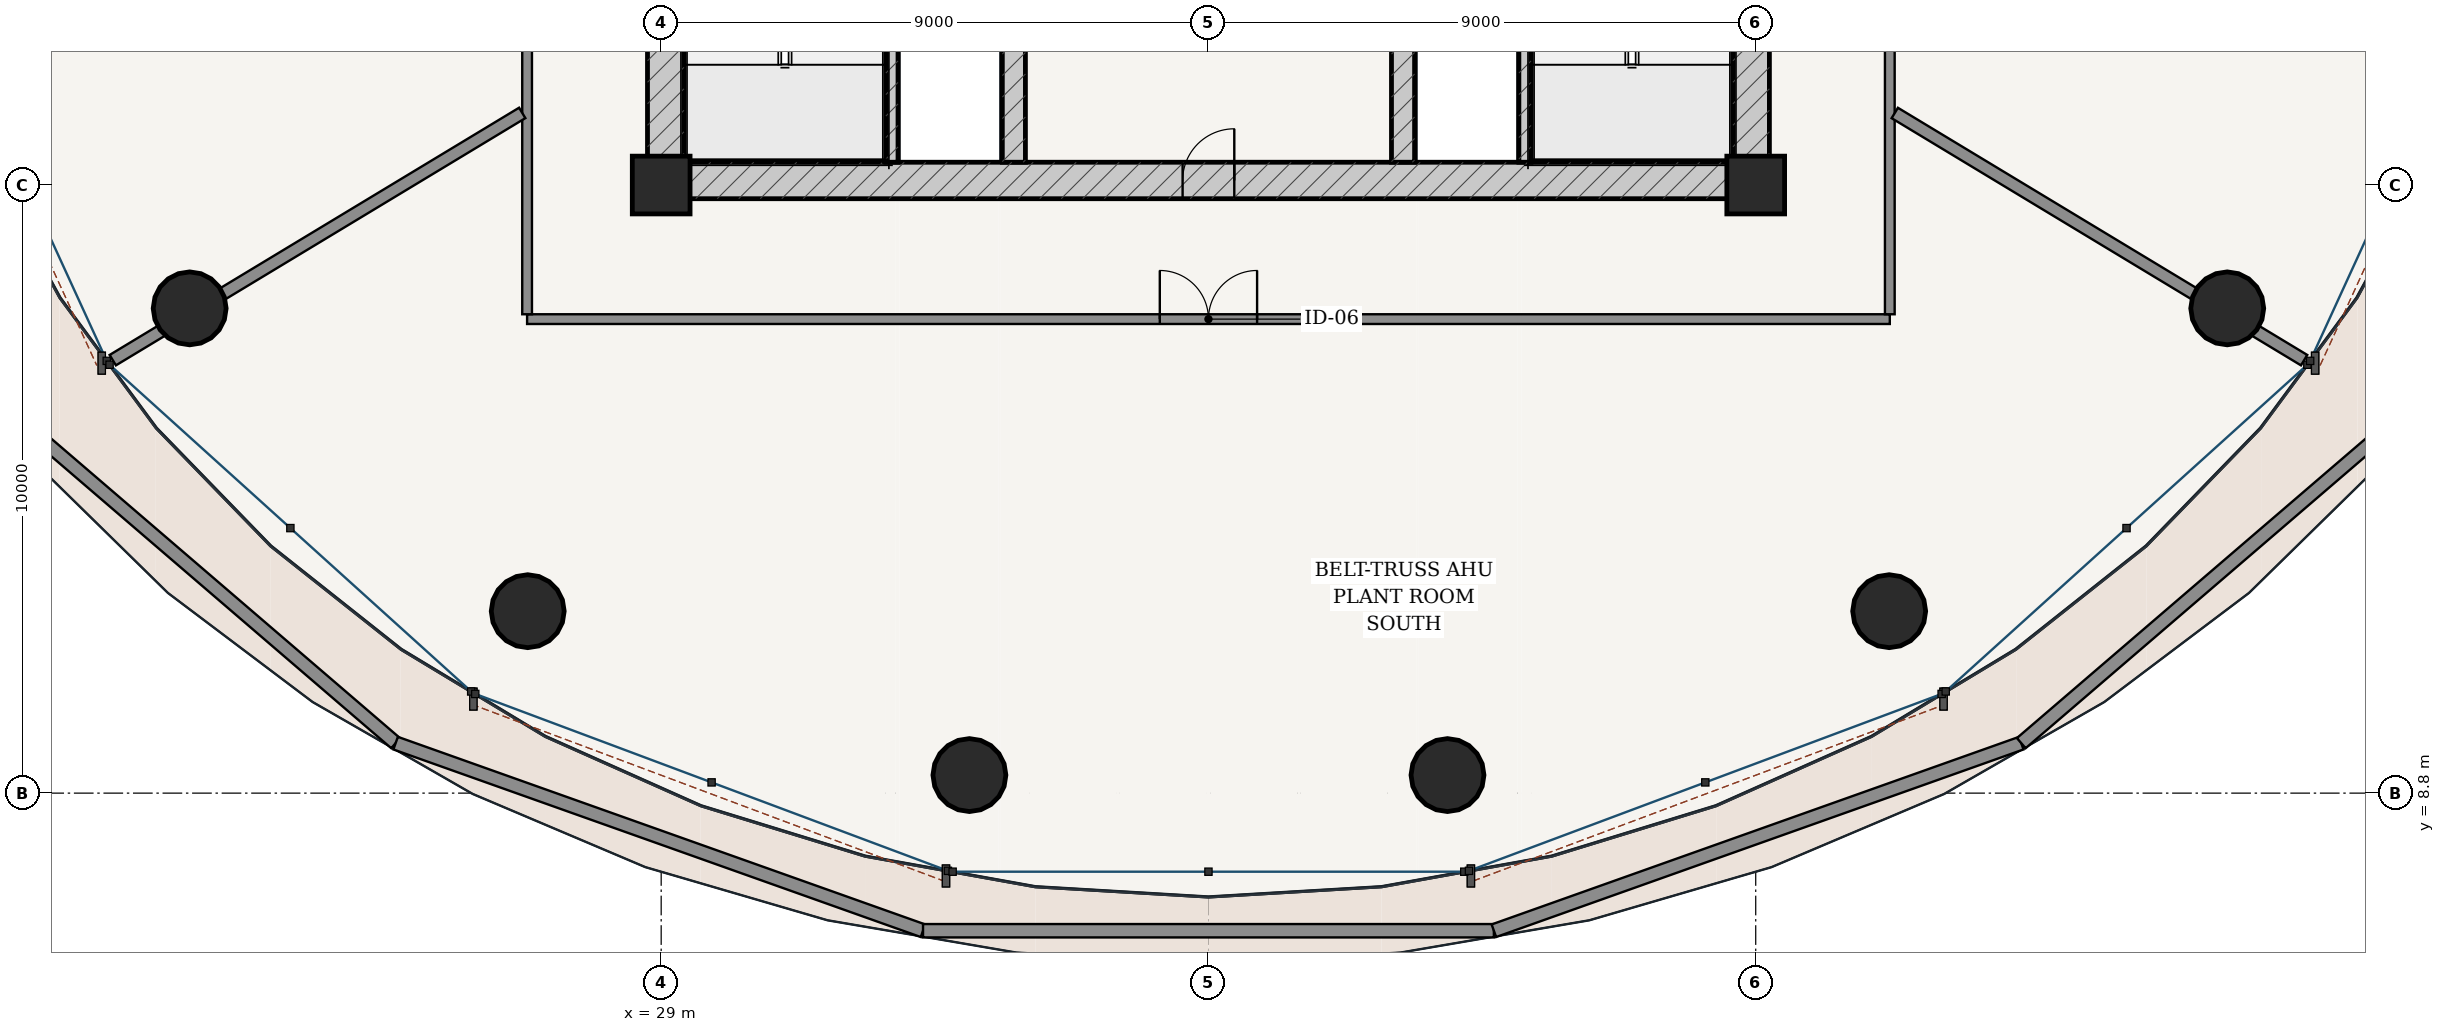
"""IFC4 building model, lengths in metres.
Left out: names, types, materials, properties, quantities, classifications, styles, units other than length and angle.
Written with IfcOpenShell. Run it as: python <this file> out.ifc"""

import sys

from ifc_helpers import new_model, si_unit, direction, frame, frame_2d, origin, origin_2d, place, context, subcontext, project, spatial, rectangle, hollow_circle, extrude, source, transform, mapped, element, fill, save


model = new_model("IFC4")
c1 = context("Model", 3, precision=1e-05, world=origin(), true_north=direction((-0.2419218956, 0.970295726276)))
c2 = subcontext(c1, "Body", "Model", "MODEL_VIEW")
j1 = project(units=[si_unit("LENGTHUNIT", "METRE"), si_unit("PLANEANGLEUNIT", "RADIAN")], contexts=[c1])
p1 = place(None, origin())
s1 = spatial("IfcSite", under=j1, at=p1, CompositionType="ELEMENT")
p2 = place(p1, origin())
s2 = spatial("IfcBuilding", under=s1, at=p2, CompositionType="ELEMENT")
p3 = place(p2, frame((0.0, 0.0, 185.8)))
s3 = spatial("IfcBuildingStorey", under=s2, at=p3, CompositionType="ELEMENT", Elevation=185.8)
for number, where, z_axis, x_axis in (
    (1, (29.0, 18.8, 0.0), (0.0, 0.0, 1.0), (1.0, 0.0, 0.0)),
    (2, (47.0, 18.8, 0.0), (0.0, 0.0, 1.0), (1.0, 0.0, 0.0)),
):
    element("IfcColumn", number, at=place(p3, frame(where, z_axis=z_axis, x_axis=x_axis)), inside=s3, PredefinedType="COLUMN", context=c2, shape_type="SweptSolid", body=[
        extrude(rectangle(XDim=0.95, YDim=0.95, at=origin_2d()), origin(), (0.0, 0.0, 1.0), 5.4),
    ])
p4 = place(p3, frame((28.775, 18.875, 0.0), z_axis=(0.0, 0.0, 1.0), x_axis=(1.0, 0.0, 0.0)))
e3 = element("IfcWall", 3, at=p4, inside=s3, PredefinedType="SHEAR", context=c2, shape_type="SweptSolid", body=[
    extrude(rectangle(XDim=18.45, YDim=0.6, at=frame_2d((9.225, 0.0))), origin(), (0.0, 0.0, 1.0), 5.135),
])
p5 = place(p4, frame((8.8, 0.0, 0.0)))
e4 = element("IfcOpeningElement", 4, at=p5, cuts=e3, PredefinedType="OPENING", context=c2, shape_type="SweptSolid", body=[
    extrude(rectangle(XDim=0.85, YDim=2.1, at=frame_2d((0.425, 1.05))), frame((0.0, 0.31, 0.0), z_axis=(0.0, -1.0, 0.0), x_axis=(1.0, 0.0, 0.0)), (0.0, 0.0, 1.0), 0.62),
])
p6 = place(p3, frame((29.075, 19.175, 0.0), z_axis=(0.0, 0.0, 1.0), x_axis=(0.0, 1.0, 0.0)))
e5 = element("IfcWall", 5, at=p6, inside=s3, PredefinedType="SHEAR", context=c2, shape_type="SweptSolid", body=[
    extrude(rectangle(XDim=15.25, YDim=0.6, at=frame_2d((7.625, 0.0))), origin(), (0.0, 0.0, 1.0), 5.135),
])
p7 = place(p6, frame((9.875, 0.0, 0.0)))
e6 = element("IfcOpeningElement", 6, at=p7, cuts=e5, PredefinedType="OPENING", context=c2, shape_type="SweptSolid", body=[
    extrude(rectangle(XDim=1.5, YDim=2.2, at=frame_2d((0.75, 1.1))), frame((0.0, 0.31, 0.0), z_axis=(0.0, -1.0, 0.0), x_axis=(1.0, 0.0, 0.0)), (0.0, 0.0, 1.0), 0.62),
])
p8 = place(p3, frame((46.925, 19.175, 0.0), z_axis=(0.0, 0.0, 1.0), x_axis=(0.0, 1.0, 0.0)))
e7 = element("IfcWall", 7, at=p8, inside=s3, PredefinedType="SHEAR", context=c2, shape_type="SweptSolid", body=[
    extrude(rectangle(XDim=15.25, YDim=0.6, at=frame_2d((7.625, 0.0))), origin(), (0.0, 0.0, 1.0), 5.135),
])
p9 = place(p8, frame((9.875, 0.0, 0.0)))
e8 = element("IfcOpeningElement", 8, at=p9, cuts=e7, PredefinedType="OPENING", context=c2, shape_type="SweptSolid", body=[
    extrude(rectangle(XDim=1.5, YDim=2.2, at=frame_2d((0.75, 1.1))), frame((0.0, 0.31, 0.0), z_axis=(0.0, -1.0, 0.0), x_axis=(1.0, 0.0, 0.0)), (0.0, 0.0, 1.0), 0.62),
])
for number, where, z_axis, x_axis in (
    (9, (32.795, 19.175, 0.0), (0.0, 0.0, 1.0), (0.0, 1.0, 0.0)),
    (10, (43.205, 19.175, 0.0), (0.0, 0.0, 1.0), (0.0, 1.0, 0.0)),
):
    element("IfcWall", number, at=place(p3, frame(where, z_axis=z_axis, x_axis=x_axis)), inside=s3, PredefinedType="SOLIDWALL", context=c2, shape_type="SweptSolid", body=[
        extrude(rectangle(XDim=7.375, YDim=0.2, at=frame_2d((3.688, 0.0))), origin(), (0.0, 0.0, 1.0), 5.135),
    ])
p10 = place(p3, frame((34.8, 19.175, 0.0), z_axis=(0.0, 0.0, 1.0), x_axis=(0.0, 1.0, 0.0)))
e11 = element("IfcWall", 11, at=p10, inside=s3, PredefinedType="SHEAR", context=c2, shape_type="SweptSolid", body=[
    extrude(rectangle(XDim=15.25, YDim=0.38, at=frame_2d((7.625, 0.0))), origin(), (0.0, 0.0, 1.0), 5.135),
])
p11 = place(p10, frame((7.8, 0.0, 0.0)))
e12 = element("IfcOpeningElement", 12, at=p11, cuts=e11, PredefinedType="OPENING", context=c2, shape_type="SweptSolid", body=[
    extrude(rectangle(XDim=1.05, YDim=2.15, at=frame_2d((0.525, 1.075))), frame((0.0, 0.2, 0.0), z_axis=(0.0, -1.0, 0.0), x_axis=(1.0, 0.0, 0.0)), (0.0, 0.0, 1.0), 0.4),
])
p12 = place(p3, frame((41.2, 19.175, 0.0), z_axis=(0.0, 0.0, 1.0), x_axis=(0.0, 1.0, 0.0)))
e13 = element("IfcWall", 13, at=p12, inside=s3, PredefinedType="SHEAR", context=c2, shape_type="SweptSolid", body=[
    extrude(rectangle(XDim=15.25, YDim=0.38, at=frame_2d((7.625, 0.0))), origin(), (0.0, 0.0, 1.0), 5.135),
])
p13 = place(p12, frame((7.8, 0.0, 0.0)))
e14 = element("IfcOpeningElement", 14, at=p13, cuts=e13, PredefinedType="OPENING", context=c2, shape_type="SweptSolid", body=[
    extrude(rectangle(XDim=1.05, YDim=2.15, at=frame_2d((0.525, 1.075))), frame((0.0, 0.2, 0.0), z_axis=(0.0, -1.0, 0.0), x_axis=(1.0, 0.0, 0.0)), (0.0, 0.0, 1.0), 0.4),
])
for number, where, z_axis, x_axis in (
    (15, (21.246, 16.772, 0.0), (0.0, 0.0, 1.0), (1.0, 0.0, 0.0)),
    (16, (26.805, 11.792, 0.0), (0.0, 0.0, 1.0), (1.0, 0.0, 0.0)),
    (17, (34.069, 9.097, 0.0), (0.0, 0.0, 1.0), (1.0, 0.0, 0.0)),
    (18, (41.931, 9.097, 0.0), (0.0, 0.0, 1.0), (1.0, 0.0, 0.0)),
    (19, (49.195, 11.792, 0.0), (0.0, 0.0, 1.0), (1.0, 0.0, 0.0)),
    (20, (54.754, 16.772, 0.0), (0.0, 0.0, 1.0), (1.0, 0.0, 0.0)),
):
    element("IfcColumn", number, at=place(p3, frame(where, z_axis=z_axis, x_axis=x_axis)), inside=s3, PredefinedType="COLUMN", context=c2, shape_type="SweptSolid", body=[
        extrude(hollow_circle(Radius=0.6, WallThickness=0.038, at=origin_2d()), origin(), (0.0, 0.0, 1.0), 5.4),
    ])
p14 = place(p3, frame((17.995, 15.322, 0.0), z_axis=(0.0, 0.0, 1.0), x_axis=(0.758673296268, -0.651471280664, 0.0)))
e21 = element("IfcWall", 21, at=p14, inside=s3, PredefinedType="PARAPET", context=c2, shape_type="SweptSolid", body=[
    extrude(rectangle(XDim=8.75, YDim=0.22, at=frame_2d((4.375, 0.0))), origin(), (0.0, 0.0, 1.0), 1.15),
])
p15 = place(p3, frame((24.633, 9.622, 0.0), z_axis=(0.0, 0.0, 1.0), x_axis=(0.942173755835, -0.335124773504, 0.0)))
e22 = element("IfcWall", 22, at=p15, inside=s3, PredefinedType="PARAPET", context=c2, shape_type="SweptSolid", body=[
    extrude(rectangle(XDim=9.205, YDim=0.22, at=frame_2d((4.603, 0.0))), origin(), (0.0, 0.0, 1.0), 1.15),
])
p16 = place(p3, frame((33.306, 6.537, 0.0), z_axis=(0.0, 0.0, 1.0), x_axis=(1.0, 0.0, 0.0)))
e23 = element("IfcWall", 23, at=p16, inside=s3, PredefinedType="PARAPET", context=c2, shape_type="SweptSolid", body=[
    extrude(rectangle(XDim=9.388, YDim=0.22, at=frame_2d((4.694, 0.0))), origin(), (0.0, 0.0, 1.0), 1.15),
])
p17 = place(p3, frame((42.694, 6.537, 0.0), z_axis=(0.0, 0.0, 1.0), x_axis=(0.942173755835, 0.335124773504, 0.0)))
e24 = element("IfcWall", 24, at=p17, inside=s3, PredefinedType="PARAPET", context=c2, shape_type="SweptSolid", body=[
    extrude(rectangle(XDim=9.205, YDim=0.22, at=frame_2d((4.603, 0.0))), origin(), (0.0, 0.0, 1.0), 1.15),
])
p18 = place(p3, frame((51.367, 9.622, 0.0), z_axis=(0.0, 0.0, 1.0), x_axis=(0.758673296268, 0.651471280664, 0.0)))
e25 = element("IfcWall", 25, at=p18, inside=s3, PredefinedType="PARAPET", context=c2, shape_type="SweptSolid", body=[
    extrude(rectangle(XDim=8.75, YDim=0.22, at=frame_2d((4.375, 0.0))), origin(), (0.0, 0.0, 1.0), 1.15),
])
p19 = place(p3, frame((26.795, 16.595, 0.0), z_axis=(0.0, 0.0, 1.0), x_axis=(1.0, 0.0, 0.0)))
e26 = element("IfcWall", 26, at=p19, inside=s3, PredefinedType="PARTITIONING", context=c2, shape_type="SweptSolid", body=[
    extrude(rectangle(XDim=22.41, YDim=0.16, at=frame_2d((11.205, 0.0))), origin(), (0.0, 0.0, 1.0), 4.651),
])
p20 = place(p19, frame((10.405, 0.0, 0.0)))
e27 = element("IfcOpeningElement", 27, at=p20, cuts=e26, PredefinedType="OPENING", context=c2, shape_type="SweptSolid", body=[
    extrude(rectangle(XDim=1.6, YDim=2.25, at=frame_2d((0.8, 1.125))), frame((0.0, 0.09, 0.0), z_axis=(0.0, -1.0, 0.0), x_axis=(1.0, 0.0, 0.0)), (0.0, 0.0, 1.0), 0.18),
])
p21 = place(p3, frame((26.795, 16.675, 0.0), z_axis=(0.0, 0.0, 1.0), x_axis=(0.0, 1.0, 0.0)))
e28 = element("IfcWall", 28, at=p21, inside=s3, PredefinedType="PARTITIONING", context=c2, shape_type="SweptSolid", body=[
    extrude(rectangle(XDim=20.25, YDim=0.16, at=frame_2d((10.125, 0.0))), origin(), (0.0, 0.0, 1.0), 4.651),
])
p22 = place(p21, frame((9.375, 0.0, 0.0)))
e29 = element("IfcOpeningElement", 29, at=p22, cuts=e28, PredefinedType="OPENING", context=c2, shape_type="SweptSolid", body=[
    extrude(rectangle(XDim=1.5, YDim=2.2, at=frame_2d((0.75, 1.1))), frame((0.0, 0.09, 0.0), z_axis=(0.0, -1.0, 0.0), x_axis=(1.0, 0.0, 0.0)), (0.0, 0.0, 1.0), 0.18),
])
p23 = place(p3, frame((49.205, 16.675, 0.0), z_axis=(0.0, 0.0, 1.0), x_axis=(0.0, 1.0, 0.0)))
e30 = element("IfcWall", 30, at=p23, inside=s3, PredefinedType="PARTITIONING", context=c2, shape_type="SweptSolid", body=[
    extrude(rectangle(XDim=20.25, YDim=0.16, at=frame_2d((10.125, 0.0))), origin(), (0.0, 0.0, 1.0), 4.651),
])
p24 = place(p23, frame((9.325, 0.0, 0.0)))
e31 = element("IfcOpeningElement", 31, at=p24, cuts=e30, PredefinedType="OPENING", context=c2, shape_type="SweptSolid", body=[
    extrude(rectangle(XDim=1.6, YDim=2.25, at=frame_2d((0.8, 1.125))), frame((0.0, 0.09, 0.0), z_axis=(0.0, -1.0, 0.0), x_axis=(1.0, 0.0, 0.0)), (0.0, 0.0, 1.0), 0.18),
])
p25 = place(p3, frame((26.715, 19.986, 0.0), z_axis=(0.0, 0.0, 1.0), x_axis=(-0.856046306453, -0.516899140266, 0.0)))
e32 = element("IfcWall", 32, at=p25, inside=s3, PredefinedType="PARTITIONING", context=c2, shape_type="SweptSolid", body=[
    extrude(rectangle(XDim=7.866, YDim=0.2, at=frame_2d((3.933, 0.0))), origin(), (0.0, 0.0, 1.0), 4.651),
])
p26 = place(p3, frame((49.287, 19.985, 0.0), z_axis=(0.0, 0.0, 1.0), x_axis=(0.856056928747, -0.516881548078, 0.0)))
e33 = element("IfcWall", 33, at=p26, inside=s3, PredefinedType="PARTITIONING", context=c2, shape_type="SweptSolid", body=[
    extrude(rectangle(XDim=7.864, YDim=0.2, at=frame_2d((3.932, 0.0))), origin(), (0.0, 0.0, 1.0), 4.651),
])
m1 = source(origin(), c2, "Body", "SweptSolid", [
    extrude(rectangle(XDim=0.85, YDim=2.1, at=frame_2d((0.425, 1.05))), frame((0.0, 0.025, 0.0), z_axis=(0.0, -1.0, 0.0), x_axis=(1.0, 0.0, 0.0)), (0.0, 0.0, 1.0), 0.05),
])
p27 = place(p5, origin())
e34 = element("IfcDoor", 34, at=p27, inside=s3, OperationType="SINGLE_SWING_RIGHT", PredefinedType="DOOR", context=c2, shape_type="MappedRepresentation", body=[
    mapped(m1, transform((0.0, 0.0, 0.0), scale=1.0)),
])
fill(e4, e34)
m2 = source(origin(), c2, "Body", "SweptSolid", [
    extrude(rectangle(XDim=1.6, YDim=2.25, at=frame_2d((0.8, 1.125))), frame((0.0, 0.025, 0.0), z_axis=(0.0, -1.0, 0.0), x_axis=(1.0, 0.0, 0.0)), (0.0, 0.0, 1.0), 0.05),
])
p28 = place(p20, origin())
e35 = element("IfcDoor", 35, at=p28, inside=s3, OperationType="DOUBLE_DOOR_SINGLE_SWING", PredefinedType="DOOR", context=c2, shape_type="MappedRepresentation", body=[
    mapped(m2, transform((0.0, 0.0, 0.0), scale=1.0)),
])
fill(e27, e35)
save(model, sys.argv[1])
